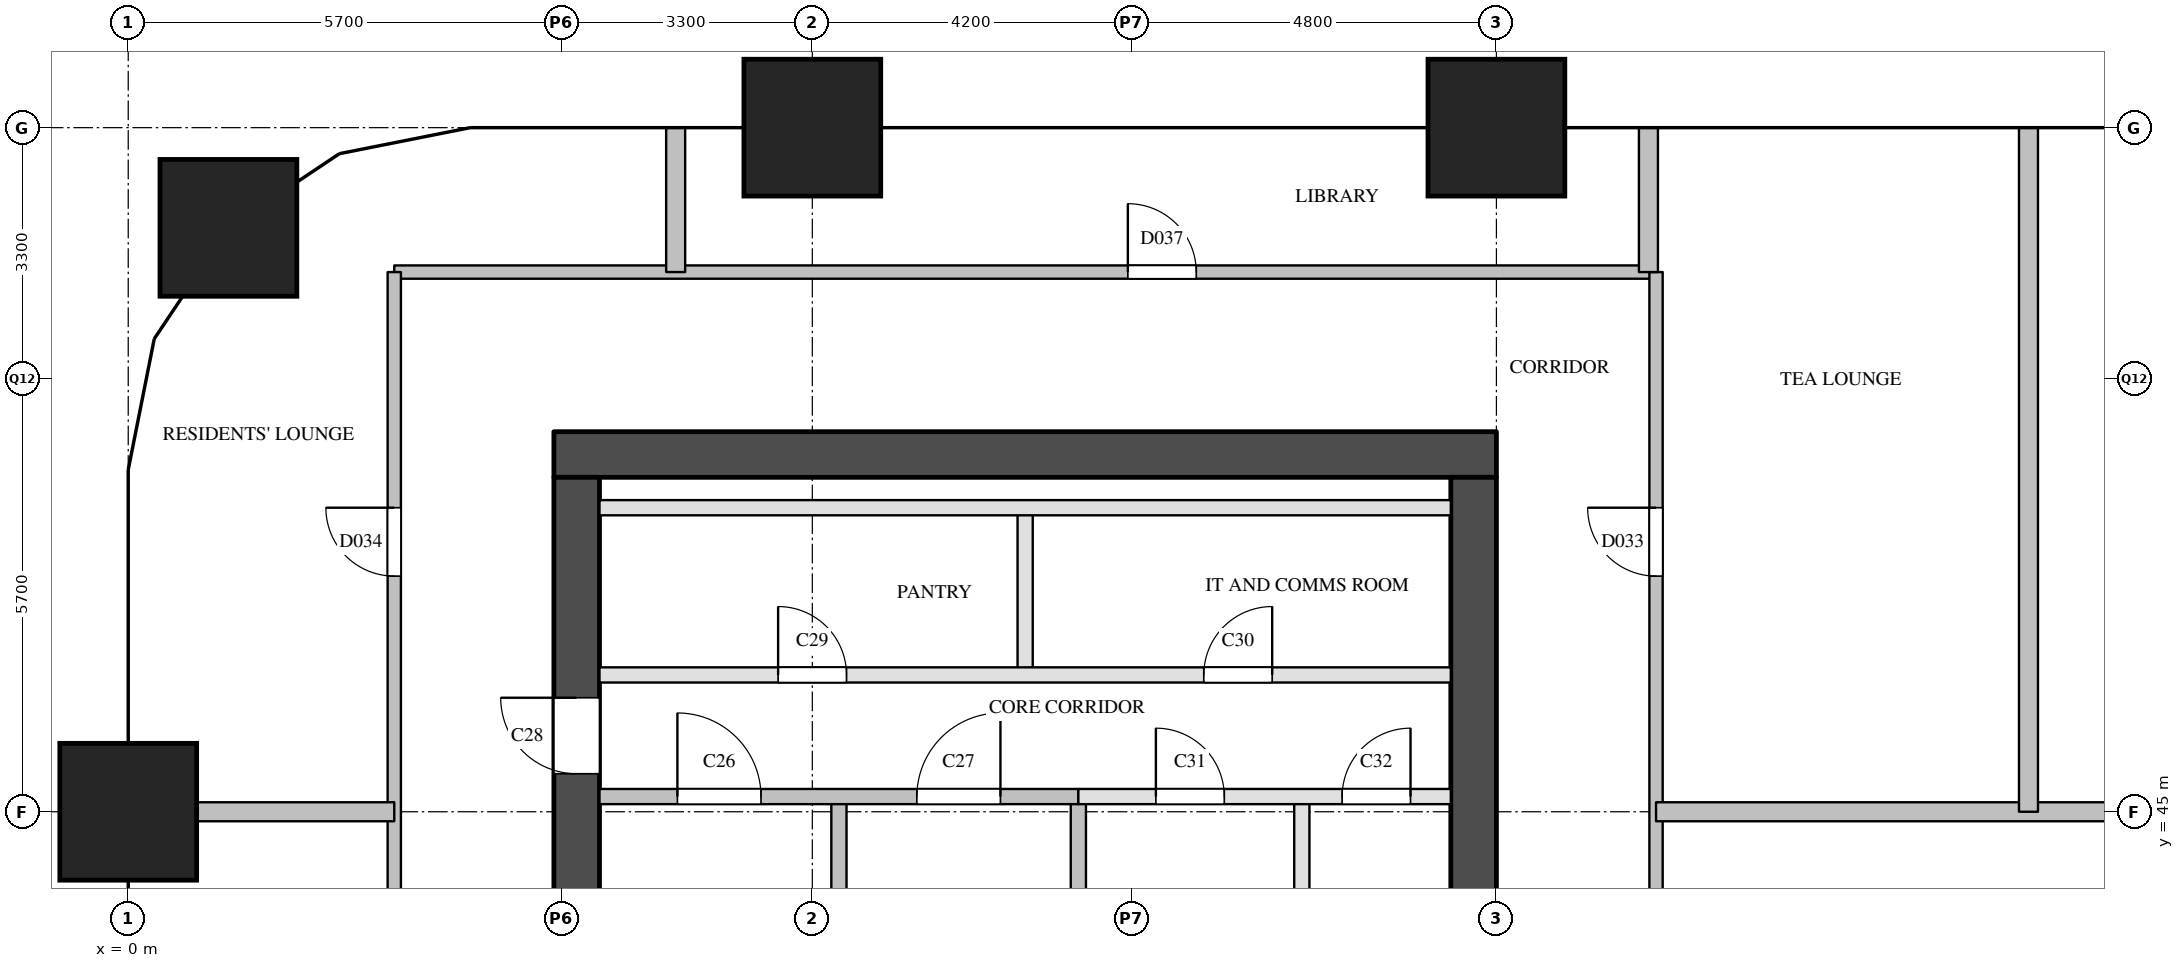
"""IFC4 building model, lengths in metres.
Left out: names, types, materials, properties, quantities, classifications, styles, units other than length and angle.
Written with IfcOpenShell. Run it as: python <this file> out.ifc"""

import sys

from ifc_helpers import new_model, si_unit, direction, frame, frame_2d, origin, origin_2d, place, context, subcontext, project, spatial, rectangle, extrude, element, fill, save


model = new_model("IFC4")
c1 = context("Model", 3, precision=1e-05, world=origin(), true_north=direction((0.0, 1.0)))
c2 = subcontext(c1, "Body", "Model", "MODEL_VIEW")
j1 = project(units=[si_unit("LENGTHUNIT", "METRE"), si_unit("PLANEANGLEUNIT", "RADIAN")], contexts=[c1])
p1 = place(None, origin())
s1 = spatial("IfcSite", under=j1, at=p1, CompositionType="ELEMENT")
p2 = place(p1, origin())
s2 = spatial("IfcBuilding", under=s1, at=p2, CompositionType="ELEMENT")
p3 = place(p2, frame((0.0, 0.0, 85.4)))
s3 = spatial("IfcBuildingStorey", under=s2, at=p3, CompositionType="ELEMENT", Elevation=85.4)
for number, where, z_axis, x_axis in (
    (1, (0.0, 45.0, 0.0), (0.0, 0.0, 1.0), (1.0, 0.0, 0.0)),
    (2, (1.318, 52.682, 0.0), (0.0, 0.0, 1.0), (1.0, 0.0, 0.0)),
    (3, (9.0, 54.0, 0.0), (0.0, 0.0, 1.0), (1.0, 0.0, 0.0)),
    (4, (18.0, 54.0, 0.0), (0.0, 0.0, 1.0), (1.0, 0.0, 0.0)),
):
    element("IfcColumn", number, at=place(p3, frame(where, z_axis=z_axis, x_axis=x_axis)), inside=s3, PredefinedType="COLUMN", context=c2, shape_type="SweptSolid", body=[
        extrude(rectangle(XDim=1.8, YDim=1.8, at=origin_2d()), origin(), (0.0, 0.0, 1.0), 3.8),
    ])
p4 = place(p3, frame((5.6, 49.7, 0.0), z_axis=(0.0, 0.0, 1.0), x_axis=(1.0, 0.0, 0.0)))
e5 = element("IfcWall", 5, at=p4, inside=s3, PredefinedType="SHEAR", context=c2, shape_type="SweptSolid", body=[
    extrude(rectangle(XDim=12.4, YDim=0.6, at=frame_2d((6.2, 0.0))), origin(), (0.0, 0.0, 1.0), 3.5),
])
p5 = place(p3, frame((5.9, 29.1, 0.0), z_axis=(0.0, 0.0, 1.0), x_axis=(0.0, 1.0, 0.0)))
e6 = element("IfcWall", 6, at=p5, inside=s3, PredefinedType="SHEAR", context=c2, shape_type="SweptSolid", body=[
    extrude(rectangle(XDim=20.3, YDim=0.6, at=frame_2d((10.15, 0.0))), origin(), (0.0, 0.0, 1.0), 3.5),
])
p6 = place(p5, frame((3.6, 0.0, 0.0)))
e7 = element("IfcOpeningElement", 7, at=p6, cuts=e6, PredefinedType="OPENING", context=c2, shape_type="SweptSolid", body=[
    extrude(rectangle(XDim=1.8, YDim=2.1, at=frame_2d((0.9, 1.05))), frame((0.0, 0.31, 0.0), z_axis=(0.0, -1.0, 0.0), x_axis=(1.0, 0.0, 0.0)), (0.0, 0.0, 1.0), 0.62),
])
p7 = place(p5, frame((16.4, 0.0, 0.0)))
e8 = element("IfcOpeningElement", 8, at=p7, cuts=e6, PredefinedType="OPENING", context=c2, shape_type="SweptSolid", body=[
    extrude(rectangle(XDim=1.0, YDim=2.1, at=frame_2d((0.5, 1.05))), frame((0.0, 0.31, 0.0), z_axis=(0.0, -1.0, 0.0), x_axis=(1.0, 0.0, 0.0)), (0.0, 0.0, 1.0), 0.62),
])
p8 = place(p3, frame((17.7, 29.1, 0.0), z_axis=(0.0, 0.0, 1.0), x_axis=(0.0, 1.0, 0.0)))
e9 = element("IfcWall", 9, at=p8, inside=s3, PredefinedType="SHEAR", context=c2, shape_type="SweptSolid", body=[
    extrude(rectangle(XDim=20.3, YDim=0.6, at=frame_2d((10.15, 0.0))), origin(), (0.0, 0.0, 1.0), 3.5),
])
p9 = place(p8, frame((1.25, 0.0, 0.0)))
e10 = element("IfcOpeningElement", 10, at=p9, cuts=e9, PredefinedType="OPENING", context=c2, shape_type="SweptSolid", body=[
    extrude(rectangle(XDim=0.7, YDim=2.1, at=frame_2d((0.35, 1.05))), frame((0.0, 0.31, 0.0), z_axis=(0.0, -1.0, 0.0), x_axis=(1.0, 0.0, 0.0)), (0.0, 0.0, 1.0), 0.62),
])
p10 = place(p8, frame((7.05, 0.0, 0.0)))
e11 = element("IfcOpeningElement", 11, at=p10, cuts=e9, PredefinedType="OPENING", context=c2, shape_type="SweptSolid", body=[
    extrude(rectangle(XDim=0.7, YDim=2.1, at=frame_2d((0.35, 1.05))), frame((0.0, 0.31, 0.0), z_axis=(0.0, -1.0, 0.0), x_axis=(1.0, 0.0, 0.0)), (0.0, 0.0, 1.0), 0.62),
])
p11 = place(p3, frame((9.35, 40.9, 0.0), z_axis=(0.0, 0.0, 1.0), x_axis=(0.0, 1.0, 0.0)))
e12 = element("IfcWall", 12, at=p11, inside=s3, PredefinedType="SOLIDWALL", context=c2, shape_type="SweptSolid", body=[
    extrude(rectangle(XDim=4.3, YDim=0.2, at=frame_2d((2.15, 0.0))), origin(), (0.0, 0.0, 1.0), 3.5),
])
p12 = place(p3, frame((11.8, 46.8, 0.0), z_axis=(0.0, 0.0, 1.0), x_axis=(0.0, 1.0, 0.0)))
e13 = element("IfcWall", 13, at=p12, inside=s3, PredefinedType="PARTITIONING", context=c2, shape_type="SweptSolid", body=[
    extrude(rectangle(XDim=2.2, YDim=0.2, at=frame_2d((1.1, 0.0))), origin(), (0.0, 0.0, 1.0), 3.5),
])
p13 = place(p3, frame((12.5, 40.9, 0.0), z_axis=(0.0, 0.0, 1.0), x_axis=(0.0, 1.0, 0.0)))
e14 = element("IfcWall", 14, at=p13, inside=s3, PredefinedType="SOLIDWALL", context=c2, shape_type="SweptSolid", body=[
    extrude(rectangle(XDim=4.3, YDim=0.2, at=frame_2d((2.15, 0.0))), origin(), (0.0, 0.0, 1.0), 3.5),
])
p14 = place(p3, frame((15.44, 39.0, 0.0), z_axis=(0.0, 0.0, 1.0), x_axis=(0.0, 1.0, 0.0)))
e15 = element("IfcWall", 15, at=p14, inside=s3, PredefinedType="PARTITIONING", context=c2, shape_type="SweptSolid", body=[
    extrude(rectangle(XDim=6.2, YDim=0.2, at=frame_2d((3.1, 0.0))), origin(), (0.0, 0.0, 1.0), 3.5),
])
p15 = place(p3, frame((12.5, 45.2, 0.0), z_axis=(0.0, 0.0, 1.0), x_axis=(1.0, 0.0, 0.0)))
e16 = element("IfcWall", 16, at=p15, inside=s3, PredefinedType="PARTITIONING", context=c2, shape_type="SweptSolid", body=[
    extrude(rectangle(XDim=4.9, YDim=0.2, at=frame_2d((2.45, 0.0))), origin(), (0.0, 0.0, 1.0), 3.5),
])
p16 = place(p15, frame((1.02, 0.0, 0.0)))
e17 = element("IfcOpeningElement", 17, at=p16, cuts=e16, PredefinedType="OPENING", context=c2, shape_type="SweptSolid", body=[
    extrude(rectangle(XDim=0.9, YDim=2.1, at=frame_2d((0.45, 1.05))), frame((0.0, 0.11, 0.0), z_axis=(0.0, -1.0, 0.0), x_axis=(1.0, 0.0, 0.0)), (0.0, 0.0, 1.0), 0.22),
])
p17 = place(p15, frame((3.47, 0.0, 0.0)))
e18 = element("IfcOpeningElement", 18, at=p17, cuts=e16, PredefinedType="OPENING", context=c2, shape_type="SweptSolid", body=[
    extrude(rectangle(XDim=0.9, YDim=2.1, at=frame_2d((0.45, 1.05))), frame((0.0, 0.11, 0.0), z_axis=(0.0, -1.0, 0.0), x_axis=(1.0, 0.0, 0.0)), (0.0, 0.0, 1.0), 0.22),
])
p18 = place(p3, frame((6.2, 45.2, 0.0), z_axis=(0.0, 0.0, 1.0), x_axis=(1.0, 0.0, 0.0)))
e19 = element("IfcWall", 19, at=p18, inside=s3, PredefinedType="SOLIDWALL", context=c2, shape_type="SweptSolid", body=[
    extrude(rectangle(XDim=6.3, YDim=0.2, at=frame_2d((3.15, 0.0))), origin(), (0.0, 0.0, 1.0), 3.5),
])
p19 = place(p18, frame((1.025, 0.0, 0.0)))
e20 = element("IfcOpeningElement", 20, at=p19, cuts=e19, PredefinedType="OPENING", context=c2, shape_type="SweptSolid", body=[
    extrude(rectangle(XDim=1.1, YDim=2.1, at=frame_2d((0.55, 1.05))), frame((0.0, 0.11, 0.0), z_axis=(0.0, -1.0, 0.0), x_axis=(1.0, 0.0, 0.0)), (0.0, 0.0, 1.0), 0.22),
])
p20 = place(p18, frame((4.175, 0.0, 0.0)))
e21 = element("IfcOpeningElement", 21, at=p20, cuts=e19, PredefinedType="OPENING", context=c2, shape_type="SweptSolid", body=[
    extrude(rectangle(XDim=1.1, YDim=2.1, at=frame_2d((0.55, 1.05))), frame((0.0, 0.11, 0.0), z_axis=(0.0, -1.0, 0.0), x_axis=(1.0, 0.0, 0.0)), (0.0, 0.0, 1.0), 0.22),
])
p21 = place(p3, frame((6.2, 46.8, 0.0), z_axis=(0.0, 0.0, 1.0), x_axis=(1.0, 0.0, 0.0)))
e22 = element("IfcWall", 22, at=p21, inside=s3, PredefinedType="PARTITIONING", context=c2, shape_type="SweptSolid", body=[
    extrude(rectangle(XDim=11.2, YDim=0.2, at=frame_2d((5.6, 0.0))), origin(), (0.0, 0.0, 1.0), 3.5),
])
p22 = place(p21, frame((2.35, 0.0, 0.0)))
e23 = element("IfcOpeningElement", 23, at=p22, cuts=e22, PredefinedType="OPENING", context=c2, shape_type="SweptSolid", body=[
    extrude(rectangle(XDim=0.9, YDim=2.1, at=frame_2d((0.45, 1.05))), frame((0.0, 0.11, 0.0), z_axis=(0.0, -1.0, 0.0), x_axis=(1.0, 0.0, 0.0)), (0.0, 0.0, 1.0), 0.22),
])
p23 = place(p21, frame((7.95, 0.0, 0.0)))
e24 = element("IfcOpeningElement", 24, at=p23, cuts=e22, PredefinedType="OPENING", context=c2, shape_type="SweptSolid", body=[
    extrude(rectangle(XDim=0.9, YDim=2.1, at=frame_2d((0.45, 1.05))), frame((0.0, 0.11, 0.0), z_axis=(0.0, -1.0, 0.0), x_axis=(1.0, 0.0, 0.0)), (0.0, 0.0, 1.0), 0.22),
])
p24 = place(p3, frame((6.2, 49.0, 0.0), z_axis=(0.0, 0.0, 1.0), x_axis=(1.0, 0.0, 0.0)))
e25 = element("IfcWall", 25, at=p24, inside=s3, PredefinedType="PARTITIONING", context=c2, shape_type="SweptSolid", body=[
    extrude(rectangle(XDim=11.2, YDim=0.2, at=frame_2d((5.6, 0.0))), origin(), (0.0, 0.0, 1.0), 3.5),
])
p25 = place(p3, frame((3.5, 52.1, 0.0), z_axis=(0.0, 0.0, 1.0), x_axis=(1.0, 0.0, 0.0)))
e26 = element("IfcWall", 26, at=p25, inside=s3, PredefinedType="PARTITIONING", context=c2, shape_type="SweptSolid", body=[
    extrude(rectangle(XDim=16.6, YDim=0.175, at=frame_2d((8.3, 0.0))), origin(), (0.0, 0.0, 1.0), 3.5),
])
p26 = place(p25, frame((9.651, 0.0, 0.0)))
e27 = element("IfcOpeningElement", 27, at=p26, cuts=e26, PredefinedType="OPENING", context=c2, shape_type="SweptSolid", body=[
    extrude(rectangle(XDim=0.9, YDim=2.1, at=frame_2d((0.45, 1.05))), frame((0.0, 0.097, 0.0), z_axis=(0.0, -1.0, 0.0), x_axis=(1.0, 0.0, 0.0)), (0.0, 0.0, 1.0), 0.195),
])
p27 = place(p3, frame((3.5, 28.5, 0.0), z_axis=(0.0, 0.0, 1.0), x_axis=(0.0, 1.0, 0.0)))
e28 = element("IfcWall", 28, at=p27, inside=s3, PredefinedType="PARTITIONING", context=c2, shape_type="SweptSolid", body=[
    extrude(rectangle(XDim=23.6, YDim=0.175, at=frame_2d((11.8, 0.0))), origin(), (0.0, 0.0, 1.0), 3.5),
])
p28 = place(p27, frame((5.3, 0.0, 0.0)))
e29 = element("IfcOpeningElement", 29, at=p28, cuts=e28, PredefinedType="OPENING", context=c2, shape_type="SweptSolid", body=[
    extrude(rectangle(XDim=0.9, YDim=2.1, at=frame_2d((0.45, 1.05))), frame((0.0, 0.097, 0.0), z_axis=(0.0, -1.0, 0.0), x_axis=(1.0, 0.0, 0.0)), (0.0, 0.0, 1.0), 0.195),
])
p29 = place(p27, frame((13.5, 0.0, 0.0)))
e30 = element("IfcOpeningElement", 30, at=p29, cuts=e28, PredefinedType="OPENING", context=c2, shape_type="SweptSolid", body=[
    extrude(rectangle(XDim=1.0, YDim=2.1, at=frame_2d((0.5, 1.05))), frame((0.0, 0.097, 0.0), z_axis=(0.0, -1.0, 0.0), x_axis=(1.0, 0.0, 0.0)), (0.0, 0.0, 1.0), 0.195),
])
p30 = place(p27, frame((19.6, 0.0, 0.0)))
e31 = element("IfcOpeningElement", 31, at=p30, cuts=e28, PredefinedType="OPENING", context=c2, shape_type="SweptSolid", body=[
    extrude(rectangle(XDim=0.9, YDim=2.1, at=frame_2d((0.45, 1.05))), frame((0.0, 0.097, 0.0), z_axis=(0.0, -1.0, 0.0), x_axis=(1.0, 0.0, 0.0)), (0.0, 0.0, 1.0), 0.195),
])
p31 = place(p3, frame((20.1, 28.5, 0.0), z_axis=(0.0, 0.0, 1.0), x_axis=(0.0, 1.0, 0.0)))
e32 = element("IfcWall", 32, at=p31, inside=s3, PredefinedType="PARTITIONING", context=c2, shape_type="SweptSolid", body=[
    extrude(rectangle(XDim=23.6, YDim=0.175, at=frame_2d((11.8, 0.0))), origin(), (0.0, 0.0, 1.0), 3.5),
])
p32 = place(p31, frame((2.8, 0.0, 0.0)))
e33 = element("IfcOpeningElement", 33, at=p32, cuts=e32, PredefinedType="OPENING", context=c2, shape_type="SweptSolid", body=[
    extrude(rectangle(XDim=0.9, YDim=2.1, at=frame_2d((0.45, 1.05))), frame((0.0, 0.097, 0.0), z_axis=(0.0, -1.0, 0.0), x_axis=(1.0, 0.0, 0.0)), (0.0, 0.0, 1.0), 0.195),
])
p33 = place(p31, frame((19.6, 0.0, 0.0)))
e34 = element("IfcOpeningElement", 34, at=p33, cuts=e32, PredefinedType="OPENING", context=c2, shape_type="SweptSolid", body=[
    extrude(rectangle(XDim=0.9, YDim=2.1, at=frame_2d((0.45, 1.05))), frame((0.0, 0.097, 0.0), z_axis=(0.0, -1.0, 0.0), x_axis=(1.0, 0.0, 0.0)), (0.0, 0.0, 1.0), 0.195),
])
p34 = place(p3, frame((0.0, 45.0, 0.0), z_axis=(0.0, 0.0, 1.0), x_axis=(1.0, 0.0, 0.0)))
e35 = element("IfcWall", 35, at=p34, inside=s3, PredefinedType="PARTITIONING", context=c2, shape_type="SweptSolid", body=[
    extrude(rectangle(XDim=3.5, YDim=0.25, at=frame_2d((1.75, 0.0))), origin(), (0.0, 0.0, 1.0), 3.5),
])
p35 = place(p3, frame((20.1, 45.0, 0.0), z_axis=(0.0, 0.0, 1.0), x_axis=(1.0, 0.0, 0.0)))
e36 = element("IfcWall", 36, at=p35, inside=s3, PredefinedType="PARTITIONING", context=c2, shape_type="SweptSolid", body=[
    extrude(rectangle(XDim=13.8, YDim=0.25, at=frame_2d((6.9, 0.0))), origin(), (0.0, 0.0, 1.0), 3.5),
])
for number, where, z_axis, x_axis in (
    (37, (7.202, 52.1, 0.0), (0.0, 0.0, 1.0), (0.0, 1.0, 0.0)),
    (38, (20.0, 52.1, 0.0), (0.0, 0.0, 1.0), (0.0, 1.0, 0.0)),
):
    element("IfcWall", number, at=place(p3, frame(where, z_axis=z_axis, x_axis=x_axis)), inside=s3, PredefinedType="PARTITIONING", context=c2, shape_type="SweptSolid", body=[
        extrude(rectangle(XDim=1.9, YDim=0.25, at=frame_2d((0.95, 0.0))), origin(), (0.0, 0.0, 1.0), 2.5),
    ])
p36 = place(p3, frame((25.0, 45.0, 0.0), z_axis=(0.0, 0.0, 1.0), x_axis=(0.0, 1.0, 0.0)))
e39 = element("IfcWall", 39, at=p36, inside=s3, PredefinedType="PARTITIONING", context=c2, shape_type="SweptSolid", body=[
    extrude(rectangle(XDim=9.0, YDim=0.25, at=frame_2d((4.5, 0.0))), origin(), (0.0, 0.0, 1.0), 2.5),
])
p37 = place(p19, origin())
e40 = element("IfcDoor", 40, at=p37, inside=s3, OperationType="SINGLE_SWING_LEFT", PredefinedType="DOOR", context=c2, shape_type="SweptSolid", body=[
    extrude(rectangle(XDim=1.1, YDim=2.1, at=frame_2d((0.55, 1.05))), frame((0.0, 0.025, 0.0), z_axis=(0.0, -1.0, 0.0), x_axis=(1.0, 0.0, 0.0)), (0.0, 0.0, 1.0), 0.05),
])
fill(e20, e40)
p38 = place(p20, origin())
e41 = element("IfcDoor", 41, at=p38, inside=s3, OperationType="SINGLE_SWING_RIGHT", PredefinedType="DOOR", context=c2, shape_type="SweptSolid", body=[
    extrude(rectangle(XDim=1.1, YDim=2.1, at=frame_2d((0.55, 1.05))), frame((0.0, 0.025, 0.0), z_axis=(0.0, -1.0, 0.0), x_axis=(1.0, 0.0, 0.0)), (0.0, 0.0, 1.0), 0.05),
])
fill(e21, e41)
p39 = place(p7, origin())
e42 = element("IfcDoor", 42, at=p39, inside=s3, OperationType="SINGLE_SWING_RIGHT", PredefinedType="DOOR", context=c2, shape_type="SweptSolid", body=[
    extrude(rectangle(XDim=1.0, YDim=2.1, at=frame_2d((0.5, 1.05))), frame((0.0, 0.025, 0.0), z_axis=(0.0, -1.0, 0.0), x_axis=(1.0, 0.0, 0.0)), (0.0, 0.0, 1.0), 0.05),
])
fill(e8, e42)
p40 = place(p22, origin())
e43 = element("IfcDoor", 43, at=p40, inside=s3, OperationType="SINGLE_SWING_LEFT", PredefinedType="DOOR", context=c2, shape_type="SweptSolid", body=[
    extrude(rectangle(XDim=0.9, YDim=2.1, at=frame_2d((0.45, 1.05))), frame((0.0, 0.025, 0.0), z_axis=(0.0, -1.0, 0.0), x_axis=(1.0, 0.0, 0.0)), (0.0, 0.0, 1.0), 0.05),
])
fill(e23, e43)
p41 = place(p23, origin())
e44 = element("IfcDoor", 44, at=p41, inside=s3, OperationType="SINGLE_SWING_RIGHT", PredefinedType="DOOR", context=c2, shape_type="SweptSolid", body=[
    extrude(rectangle(XDim=0.9, YDim=2.1, at=frame_2d((0.45, 1.05))), frame((0.0, 0.025, 0.0), z_axis=(0.0, -1.0, 0.0), x_axis=(1.0, 0.0, 0.0)), (0.0, 0.0, 1.0), 0.05),
])
fill(e24, e44)
p42 = place(p16, origin())
e45 = element("IfcDoor", 45, at=p42, inside=s3, OperationType="SINGLE_SWING_LEFT", PredefinedType="DOOR", context=c2, shape_type="SweptSolid", body=[
    extrude(rectangle(XDim=0.9, YDim=2.1, at=frame_2d((0.45, 1.05))), frame((0.0, 0.025, 0.0), z_axis=(0.0, -1.0, 0.0), x_axis=(1.0, 0.0, 0.0)), (0.0, 0.0, 1.0), 0.05),
])
fill(e17, e45)
p43 = place(p17, origin())
e46 = element("IfcDoor", 46, at=p43, inside=s3, OperationType="SINGLE_SWING_RIGHT", PredefinedType="DOOR", context=c2, shape_type="SweptSolid", body=[
    extrude(rectangle(XDim=0.9, YDim=2.1, at=frame_2d((0.45, 1.05))), frame((0.0, 0.025, 0.0), z_axis=(0.0, -1.0, 0.0), x_axis=(1.0, 0.0, 0.0)), (0.0, 0.0, 1.0), 0.05),
])
fill(e18, e46)
p44 = place(p33, origin())
e47 = element("IfcDoor", 47, at=p44, inside=s3, OperationType="SINGLE_SWING_RIGHT", PredefinedType="DOOR", context=c2, shape_type="SweptSolid", body=[
    extrude(rectangle(XDim=0.9, YDim=2.1, at=frame_2d((0.45, 1.05))), frame((0.0, 0.025, 0.0), z_axis=(0.0, -1.0, 0.0), x_axis=(1.0, 0.0, 0.0)), (0.0, 0.0, 1.0), 0.05),
])
fill(e34, e47)
p45 = place(p30, origin())
e48 = element("IfcDoor", 48, at=p45, inside=s3, OperationType="SINGLE_SWING_RIGHT", PredefinedType="DOOR", context=c2, shape_type="SweptSolid", body=[
    extrude(rectangle(XDim=0.9, YDim=2.1, at=frame_2d((0.45, 1.05))), frame((0.0, 0.025, 0.0), z_axis=(0.0, -1.0, 0.0), x_axis=(1.0, 0.0, 0.0)), (0.0, 0.0, 1.0), 0.05),
])
fill(e31, e48)
p46 = place(p26, origin())
e49 = element("IfcDoor", 49, at=p46, inside=s3, OperationType="SINGLE_SWING_LEFT", PredefinedType="DOOR", context=c2, shape_type="SweptSolid", body=[
    extrude(rectangle(XDim=0.9, YDim=2.1, at=frame_2d((0.45, 1.05))), frame((0.0, 0.025, 0.0), z_axis=(0.0, -1.0, 0.0), x_axis=(1.0, 0.0, 0.0)), (0.0, 0.0, 1.0), 0.05),
])
fill(e27, e49)
save(model, sys.argv[1])
